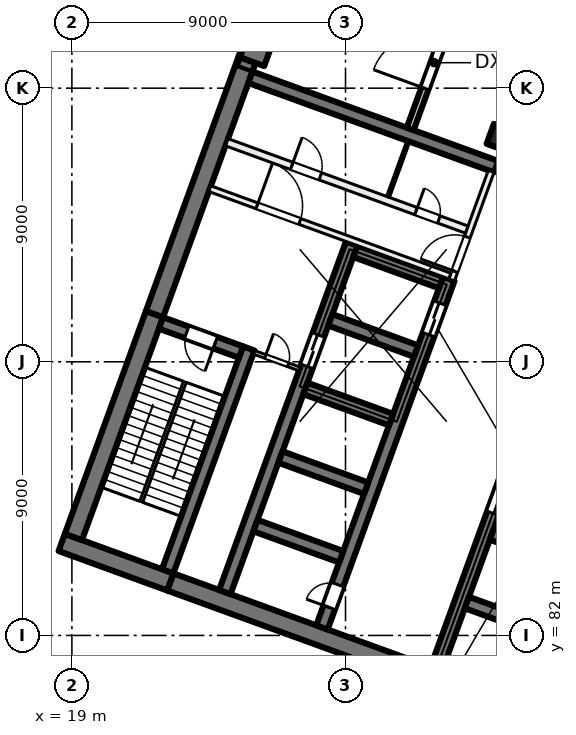
"""IFC4 building model, lengths in metres.
Left out: names, types, materials, properties, quantities, classifications, styles, units other than length and angle.
Written with IfcOpenShell. Run it as: python <this file> out.ifc"""

import sys

from ifc_helpers import new_model, si_unit, direction, frame, frame_2d, origin, origin_2d, place, context, subcontext, project, spatial, rectangle, extrude, element, fill, save


model = new_model("IFC4")
c1 = context("Model", 3, precision=1e-05, world=origin(), true_north=direction((0.0, 1.0)))
c2 = subcontext(c1, "Body", "Model", "MODEL_VIEW")
j1 = project(units=[si_unit("LENGTHUNIT", "METRE"), si_unit("PLANEANGLEUNIT", "RADIAN")], contexts=[c1])
p1 = place(None, origin())
s1 = spatial("IfcSite", under=j1, at=p1, CompositionType="ELEMENT")
p2 = place(p1, origin())
s2 = spatial("IfcBuilding", under=s1, at=p2, CompositionType="ELEMENT")
p3 = place(p2, frame((0.0, 0.0, 75.5)))
s3 = spatial("IfcBuildingStorey", under=s2, at=p3, CompositionType="ELEMENT", Elevation=75.5)
p4 = place(p3, frame((33.091, 98.379, 0.0), z_axis=(0.0, 0.0, 1.0), x_axis=(-0.342020143326, -0.939692620786, 0.0)))
e1 = element("IfcColumn", 1, at=p4, inside=s3, PredefinedType="COLUMN", context=c2, shape_type="SweptSolid", body=[
    extrude(rectangle(XDim=0.7, YDim=0.7, at=origin_2d()), origin(), (0.0, 0.0, 1.0), 5.5),
])
p5 = place(p3, frame((25.056, 101.303, 0.0), z_axis=(0.0, 0.0, 1.0), x_axis=(-0.342020143326, -0.939692620786, 0.0)))
e2 = element("IfcColumn", 2, at=p5, inside=s3, PredefinedType="COLUMN", context=c2, shape_type="SweptSolid", body=[
    extrude(rectangle(XDim=0.9, YDim=0.9, at=origin_2d()), origin(), (0.0, 0.0, 1.0), 5.5),
])
p6 = place(p3, frame((35.767, 78.835, 0.0), z_axis=(0.0, 0.0, 1.0), x_axis=(-0.939692894512, 0.342019391267, 0.0)))
e3 = element("IfcWall", 3, at=p6, inside=s3, PredefinedType="SHEAR", context=c2, shape_type="SweptSolid", body=[
    extrude(rectangle(XDim=14.4, YDim=0.6, at=frame_2d((7.2, 0.0))), origin(), (0.0, 0.0, 1.0), 5.5),
])
p7 = place(p3, frame((22.236, 83.76, 0.0), z_axis=(0.0, 0.0, 1.0), x_axis=(-0.939680822529, 0.342052557032, 0.0)))
e4 = element("IfcWall", 4, at=p7, inside=s3, PredefinedType="SHEAR", context=c2, shape_type="SweptSolid", body=[
    extrude(rectangle(XDim=3.8, YDim=0.6, at=frame_2d((1.9, 0.0))), origin(), (0.0, 0.0, 1.0), 5.5),
])
p8 = place(p3, frame((19.05, 85.239, 0.0), z_axis=(0.0, 0.0, 1.0), x_axis=(0.342016982193, 0.939693771338, 0.0)))
e5 = element("IfcWall", 5, at=p8, inside=s3, PredefinedType="SHEAR", context=c2, shape_type="SweptSolid", body=[
    extrude(rectangle(XDim=7.8, YDim=0.6, at=frame_2d((3.9, 0.0))), origin(), (0.0, 0.0, 1.0), 5.5),
])
p9 = place(p3, frame((21.717, 92.568, 0.0), z_axis=(0.0, 0.0, 1.0), x_axis=(0.342016162452, 0.939694069696, 0.0)))
e6 = element("IfcWall", 6, at=p9, inside=s3, PredefinedType="SHEAR", context=c2, shape_type="SweptSolid", body=[
    extrude(rectangle(XDim=8.9, YDim=0.6, at=frame_2d((4.45, 0.0))), origin(), (0.0, 0.0, 1.0), 5.5),
])
p10 = place(p3, frame((22.15, 84.11, 0.0), z_axis=(0.0, 0.0, 1.0), x_axis=(0.342016982193, 0.939693771338, 0.0)))
e7 = element("IfcWall", 7, at=p10, inside=s3, PredefinedType="SHEAR", context=c2, shape_type="SweptSolid", body=[
    extrude(rectangle(XDim=7.8, YDim=0.4, at=frame_2d((3.9, 0.0))), origin(), (0.0, 0.0, 1.0), 5.5),
])
p11 = place(p3, frame((24.562, 91.32, 0.0), z_axis=(0.0, 0.0, 1.0), x_axis=(-0.939717030584, 0.341953070509, 0.0)))
e8 = element("IfcWall", 8, at=p11, inside=s3, PredefinedType="SHEAR", context=c2, shape_type="SweptSolid", body=[
    extrude(rectangle(XDim=2.8, YDim=0.4, at=frame_2d((1.4, 0.0))), origin(), (0.0, 0.0, 1.0), 5.5),
])
p12 = place(p11, frame((0.9, 0.0, 0.0)))
e9 = element("IfcOpeningElement", 9, at=p12, cuts=e8, PredefinedType="OPENING", context=c2, shape_type="SweptSolid", body=[
    extrude(rectangle(XDim=1.0, YDim=2.1, at=frame_2d((0.5, 1.05))), frame((0.0, 0.21, 0.0), z_axis=(0.0, -1.0, 0.0), x_axis=(1.0, 0.0, 0.0)), (0.0, 0.0, 1.0), 0.42),
])
p13 = place(p3, frame((30.984, 80.895, 0.0), z_axis=(0.0, 0.0, 1.0), x_axis=(0.342021021735, 0.939692301071, 0.0)))
e10 = element("IfcWall", 10, at=p13, inside=s3, PredefinedType="SHEAR", context=c2, shape_type="SweptSolid", body=[
    extrude(rectangle(XDim=12.2, YDim=0.4, at=frame_2d((6.1, 0.0))), origin(), (0.0, 0.0, 1.0), 5.5),
])
p14 = place(p13, frame((5.45, 0.0, 0.0)))
e11 = element("IfcOpeningElement", 11, at=p14, cuts=e10, PredefinedType="OPENING", context=c2, shape_type="SweptSolid", body=[
    extrude(rectangle(XDim=1.1, YDim=2.1, at=frame_2d((0.55, 1.05))), frame((0.0, 0.21, 0.0), z_axis=(0.0, -1.0, 0.0), x_axis=(1.0, 0.0, 0.0)), (0.0, 0.0, 1.0), 0.42),
])
p15 = place(p13, frame((7.85, 0.0, 0.0)))
e12 = element("IfcOpeningElement", 12, at=p15, cuts=e10, PredefinedType="OPENING", context=c2, shape_type="SweptSolid", body=[
    extrude(rectangle(XDim=1.1, YDim=2.1, at=frame_2d((0.55, 1.05))), frame((0.0, 0.21, 0.0), z_axis=(0.0, -1.0, 0.0), x_axis=(1.0, 0.0, 0.0)), (0.0, 0.0, 1.0), 0.42),
])
p16 = place(p13, frame((10.25, 0.0, 0.0)))
e13 = element("IfcOpeningElement", 13, at=p16, cuts=e10, PredefinedType="OPENING", context=c2, shape_type="SweptSolid", body=[
    extrude(rectangle(XDim=1.1, YDim=2.1, at=frame_2d((0.55, 1.05))), frame((0.0, 0.21, 0.0), z_axis=(0.0, -1.0, 0.0), x_axis=(1.0, 0.0, 0.0)), (0.0, 0.0, 1.0), 0.42),
])
for number, where, z_axis, x_axis in (
    (14, (34.812, 82.056, 0.0), (0.0, 0.0, 1.0), (-0.94, 0.342, 0.0)),
    (15, (35.632, 84.311, 0.0), (0.0, 0.0, 1.0), (-0.94, 0.342, 0.0)),
):
    element("IfcWall", number, at=place(p3, frame(where, z_axis=z_axis, x_axis=x_axis)), inside=s3, PredefinedType="SHEAR", context=c2, shape_type="SweptSolid", body=[
        extrude(rectangle(XDim=3.0, YDim=0.4, at=frame_2d((1.5, 0.0))), origin(), (0.0, 0.0, 1.0), 5.5),
    ])
p17 = place(p3, frame((27.225, 82.263, 0.0), z_axis=(0.0, 0.0, 1.0), x_axis=(0.342014590177, 0.939694641948, 0.0)))
e16 = element("IfcWall", 16, at=p17, inside=s3, PredefinedType="SHEAR", context=c2, shape_type="SweptSolid", body=[
    extrude(rectangle(XDim=12.2, YDim=0.4, at=frame_2d((6.1, 0.0))), origin(), (0.0, 0.0, 1.0), 5.5),
])
p18 = place(p17, frame((10.25, 0.0, 0.0)))
e17 = element("IfcOpeningElement", 17, at=p18, cuts=e16, PredefinedType="OPENING", context=c2, shape_type="SweptSolid", body=[
    extrude(rectangle(XDim=1.1, YDim=2.1, at=frame_2d((0.55, 1.05))), frame((0.0, 0.21, 0.0), z_axis=(0.0, -1.0, 0.0), x_axis=(1.0, 0.0, 0.0)), (0.0, 0.0, 1.0), 0.42),
])
p19 = place(p17, frame((0.7, 0.0, 0.0)))
e18 = element("IfcOpeningElement", 18, at=p19, cuts=e16, PredefinedType="OPENING", context=c2, shape_type="SweptSolid", body=[
    extrude(rectangle(XDim=0.8, YDim=2.1, at=frame_2d((0.4, 1.05))), frame((0.0, 0.21, 0.0), z_axis=(0.0, -1.0, 0.0), x_axis=(1.0, 0.0, 0.0)), (0.0, 0.0, 1.0), 0.42),
])
p20 = place(p3, frame((24.03, 83.426, 0.0), z_axis=(0.0, 0.0, 1.0), x_axis=(0.342014590177, 0.939694641948, 0.0)))
e19 = element("IfcWall", 19, at=p20, inside=s3, PredefinedType="SHEAR", context=c2, shape_type="SweptSolid", body=[
    extrude(rectangle(XDim=12.2, YDim=0.4, at=frame_2d((6.1, 0.0))), origin(), (0.0, 0.0, 1.0), 5.5),
])
p21 = place(p20, frame((7.9, 0.0, 0.0)))
e20 = element("IfcOpeningElement", 20, at=p21, cuts=e19, PredefinedType="OPENING", context=c2, shape_type="SweptSolid", body=[
    extrude(rectangle(XDim=1.1, YDim=2.1, at=frame_2d((0.55, 1.05))), frame((0.0, 0.21, 0.0), z_axis=(0.0, -1.0, 0.0), x_axis=(1.0, 0.0, 0.0)), (0.0, 0.0, 1.0), 0.42),
])
p22 = place(p3, frame((27.858, 84.587, 0.0), z_axis=(0.0, 0.0, 1.0), x_axis=(-0.939686455819, 0.342037080957, 0.0)))
e21 = element("IfcWall", 21, at=p22, inside=s3, PredefinedType="SHEAR", context=c2, shape_type="SweptSolid", body=[
    extrude(rectangle(XDim=3.0, YDim=0.4, at=frame_2d((1.5, 0.0))), origin(), (0.0, 0.0, 1.0), 5.5),
])
p23 = place(p3, frame((28.678, 86.842, 0.0), z_axis=(0.0, 0.0, 1.0), x_axis=(-0.939676934218, 0.342063238742, 0.0)))
e22 = element("IfcWall", 22, at=p23, inside=s3, PredefinedType="SHEAR", context=c2, shape_type="SweptSolid", body=[
    extrude(rectangle(XDim=3.0, YDim=0.4, at=frame_2d((1.5, 0.0))), origin(), (0.0, 0.0, 1.0), 5.5),
])
for number, where, z_axis, x_axis in (
    (23, (29.5, 89.097, 0.0), (0.0, 0.0, 1.0), (-0.94, 0.342, 0.0)),
    (24, (30.32, 91.353, 0.0), (0.0, 0.0, 1.0), (-0.94, 0.342, 0.0)),
    (25, (31.141, 93.608, 0.0), (0.0, 0.0, 1.0), (-0.94, 0.342, 0.0)),
):
    element("IfcWall", number, at=place(p3, frame(where, z_axis=z_axis, x_axis=x_axis)), inside=s3, PredefinedType="SHEAR", context=c2, shape_type="SweptSolid", body=[
        extrude(rectangle(XDim=3.0, YDim=0.4, at=frame_2d((1.5, 0.0))), origin(), (0.0, 0.0, 1.0), 5.5),
    ])
p24 = place(p3, frame((32.953, 97.418, 0.0), z_axis=(0.0, 0.0, 1.0), x_axis=(-0.93969060187, 0.342025690201, 0.0)))
e26 = element("IfcWall", 26, at=p24, inside=s3, PredefinedType="SHEAR", context=c2, shape_type="SweptSolid", body=[
    extrude(rectangle(XDim=8.6, YDim=0.4, at=frame_2d((4.3, 0.0))), origin(), (0.0, 0.0, 1.0), 5.5),
])
p25 = place(p3, frame((30.128, 98.659, 0.0), z_axis=(0.0, 0.0, 1.0), x_axis=(0.341996679836, 0.939701160466, 0.0)))
e27 = element("IfcWall", 27, at=p25, inside=s3, PredefinedType="SOLIDWALL", context=c2, shape_type="SweptSolid", body=[
    extrude(rectangle(XDim=4.637, YDim=0.24, at=frame_2d((2.319, 0.0))), origin(), (0.0, 0.0, 1.0), 5.125),
])
p26 = place(p25, frame((1.419, 0.0, 0.0)))
e28 = element("IfcOpeningElement", 28, at=p26, cuts=e27, PredefinedType="OPENING", context=c2, shape_type="SweptSolid", body=[
    extrude(rectangle(XDim=1.8, YDim=2.4, at=frame_2d((0.9, 1.2))), frame((0.0, 0.13, 0.0), z_axis=(0.0, -1.0, 0.0), x_axis=(1.0, 0.0, 0.0)), (0.0, 0.0, 1.0), 0.26),
])
p27 = place(p3, frame((31.491, 93.693, 0.0), z_axis=(0.0, 0.0, 1.0), x_axis=(0.341995824804, 0.939701471648, 0.0)))
e29 = element("IfcWall", 29, at=p27, inside=s3, PredefinedType="PARTITIONING", context=c2, shape_type="SweptSolid", body=[
    extrude(rectangle(XDim=3.8, YDim=0.2, at=frame_2d((1.9, 0.0))), origin(), (0.0, 0.0, 1.0), 5.125),
])
p28 = place(p27, frame((0.3, 0.0, 0.0)))
e30 = element("IfcOpeningElement", 30, at=p28, cuts=e29, PredefinedType="OPENING", context=c2, shape_type="SweptSolid", body=[
    extrude(rectangle(XDim=1.2, YDim=2.1, at=frame_2d((0.6, 1.05))), frame((0.0, 0.11, 0.0), z_axis=(0.0, -1.0, 0.0), x_axis=(1.0, 0.0, 0.0)), (0.0, 0.0, 1.0), 0.22),
])
p29 = place(p3, frame((23.538, 96.694, 0.0), z_axis=(0.0, 0.0, 1.0), x_axis=(0.939691552312, -0.342023078919, 0.0)))
e31 = element("IfcWall", 31, at=p29, inside=s3, PredefinedType="PARTITIONING", context=c2, shape_type="SweptSolid", body=[
    extrude(rectangle(XDim=8.4, YDim=0.2, at=frame_2d((4.2, 0.0))), origin(), (0.0, 0.0, 1.0), 5.125),
])
p30 = place(p29, frame((1.65, 0.0, 0.0)))
e32 = element("IfcOpeningElement", 32, at=p30, cuts=e31, PredefinedType="OPENING", context=c2, shape_type="SweptSolid", body=[
    extrude(rectangle(XDim=1.5, YDim=2.1, at=frame_2d((0.75, 1.05))), frame((0.0, 0.11, 0.0), z_axis=(0.0, -1.0, 0.0), x_axis=(1.0, 0.0, 0.0)), (0.0, 0.0, 1.0), 0.22),
])
p31 = place(p3, frame((24.094, 98.221, 0.0), z_axis=(0.0, 0.0, 1.0), x_axis=(0.939691552312, -0.342023078919, 0.0)))
e33 = element("IfcWall", 33, at=p31, inside=s3, PredefinedType="PARTITIONING", context=c2, shape_type="SweptSolid", body=[
    extrude(rectangle(XDim=8.4, YDim=0.25, at=frame_2d((4.2, 0.0))), origin(), (0.0, 0.0, 1.0), 5.125),
])
p32 = place(p31, frame((6.625, 0.0, 0.0)))
e34 = element("IfcOpeningElement", 34, at=p32, cuts=e33, PredefinedType="OPENING", context=c2, shape_type="SweptSolid", body=[
    extrude(rectangle(XDim=0.8, YDim=2.1, at=frame_2d((0.4, 1.05))), frame((0.0, 0.135, 0.0), z_axis=(0.0, -1.0, 0.0), x_axis=(1.0, 0.0, 0.0)), (0.0, 0.0, 1.0), 0.27),
])
p33 = place(p31, frame((2.275, 0.0, 0.0)))
e35 = element("IfcOpeningElement", 35, at=p33, cuts=e33, PredefinedType="OPENING", context=c2, shape_type="SweptSolid", body=[
    extrude(rectangle(XDim=1.0, YDim=2.1, at=frame_2d((0.5, 1.05))), frame((0.0, 0.135, 0.0), z_axis=(0.0, -1.0, 0.0), x_axis=(1.0, 0.0, 0.0)), (0.0, 0.0, 1.0), 0.27),
])
p34 = place(p3, frame((24.985, 91.312, 0.0), z_axis=(0.0, 0.0, 1.0), x_axis=(0.939708740826, -0.341975850632, 0.0)))
e36 = element("IfcWall", 36, at=p34, inside=s3, PredefinedType="PARTITIONING", context=c2, shape_type="SweptSolid", body=[
    extrude(rectangle(XDim=1.6, YDim=0.125, at=frame_2d((0.8, 0.0))), origin(), (0.0, 0.0, 1.0), 5.125),
])
p35 = place(p34, frame((0.4, 0.0, 0.0)))
e37 = element("IfcOpeningElement", 37, at=p35, cuts=e36, PredefinedType="OPENING", context=c2, shape_type="SweptSolid", body=[
    extrude(rectangle(XDim=0.8, YDim=2.1, at=frame_2d((0.4, 1.05))), frame((0.0, 0.073, 0.0), z_axis=(0.0, -1.0, 0.0), x_axis=(1.0, 0.0, 0.0)), (0.0, 0.0, 1.0), 0.145),
])
p36 = place(p3, frame((29.399, 96.424, 0.0), z_axis=(0.0, 0.0, 1.0), x_axis=(0.341913947243, 0.939731266204, 0.0)))
e38 = element("IfcWall", 38, at=p36, inside=s3, PredefinedType="PARTITIONING", context=c2, shape_type="SweptSolid", body=[
    extrude(rectangle(XDim=1.95, YDim=0.1, at=frame_2d((0.975, 0.0))), origin(), (0.0, 0.0, 1.0), 5.125),
])
p37 = place(p26, origin())
e39 = element("IfcDoor", 39, at=p37, inside=s3, OperationType="DOUBLE_DOOR_SINGLE_SWING", PredefinedType="DOOR", context=c2, shape_type="SweptSolid", body=[
    extrude(rectangle(XDim=1.8, YDim=2.4, at=frame_2d((0.9, 1.2))), frame((0.0, 0.025, 0.0), z_axis=(0.0, -1.0, 0.0), x_axis=(1.0, 0.0, 0.0)), (0.0, 0.0, 1.0), 0.05),
])
fill(e28, e39)
p38 = place(p18, origin())
e40 = element("IfcDoor", 40, at=p38, inside=s3, OperationType="DOUBLE_DOOR_SLIDING", PredefinedType="DOOR", context=c2, shape_type="SweptSolid", body=[
    extrude(rectangle(XDim=1.1, YDim=2.1, at=frame_2d((0.55, 1.05))), frame((0.0, 0.025, 0.0), z_axis=(0.0, -1.0, 0.0), x_axis=(1.0, 0.0, 0.0)), (0.0, 0.0, 1.0), 0.05),
])
fill(e17, e40)
p39 = place(p14, origin())
e41 = element("IfcDoor", 41, at=p39, inside=s3, OperationType="DOUBLE_DOOR_SLIDING", PredefinedType="DOOR", context=c2, shape_type="SweptSolid", body=[
    extrude(rectangle(XDim=1.1, YDim=2.1, at=frame_2d((0.55, 1.05))), frame((0.0, 0.025, 0.0), z_axis=(0.0, -1.0, 0.0), x_axis=(1.0, 0.0, 0.0)), (0.0, 0.0, 1.0), 0.05),
])
fill(e11, e41)
p40 = place(p19, origin())
e42 = element("IfcDoor", 42, at=p40, inside=s3, OperationType="SINGLE_SWING_LEFT", PredefinedType="DOOR", context=c2, shape_type="SweptSolid", body=[
    extrude(rectangle(XDim=0.8, YDim=2.1, at=frame_2d((0.4, 1.05))), frame((0.0, 0.025, 0.0), z_axis=(0.0, -1.0, 0.0), x_axis=(1.0, 0.0, 0.0)), (0.0, 0.0, 1.0), 0.05),
])
fill(e18, e42)
p41 = place(p28, origin())
e43 = element("IfcDoor", 43, at=p41, inside=s3, OperationType="DOUBLE_DOOR_SINGLE_SWING", PredefinedType="DOOR", context=c2, shape_type="SweptSolid", body=[
    extrude(rectangle(XDim=1.2, YDim=2.1, at=frame_2d((0.6, 1.05))), frame((0.0, 0.025, 0.0), z_axis=(0.0, -1.0, 0.0), x_axis=(1.0, 0.0, 0.0)), (0.0, 0.0, 1.0), 0.05),
])
fill(e30, e43)
p42 = place(p30, origin())
e44 = element("IfcDoor", 44, at=p42, inside=s3, OperationType="DOUBLE_DOOR_SINGLE_SWING", PredefinedType="DOOR", context=c2, shape_type="SweptSolid", body=[
    extrude(rectangle(XDim=1.5, YDim=2.1, at=frame_2d((0.75, 1.05))), frame((0.0, 0.025, 0.0), z_axis=(0.0, -1.0, 0.0), x_axis=(1.0, 0.0, 0.0)), (0.0, 0.0, 1.0), 0.05),
])
fill(e32, e44)
p43 = place(p12, origin())
e45 = element("IfcDoor", 45, at=p43, inside=s3, OperationType="SINGLE_SWING_LEFT", PredefinedType="DOOR", context=c2, shape_type="SweptSolid", body=[
    extrude(rectangle(XDim=1.0, YDim=2.1, at=frame_2d((0.5, 1.05))), frame((0.0, 0.025, 0.0), z_axis=(0.0, -1.0, 0.0), x_axis=(1.0, 0.0, 0.0)), (0.0, 0.0, 1.0), 0.05),
])
fill(e9, e45)
p44 = place(p35, origin())
e46 = element("IfcDoor", 46, at=p44, inside=s3, OperationType="SINGLE_SWING_RIGHT", PredefinedType="DOOR", context=c2, shape_type="SweptSolid", body=[
    extrude(rectangle(XDim=0.8, YDim=2.1, at=frame_2d((0.4, 1.05))), frame((0.0, 0.025, 0.0), z_axis=(0.0, -1.0, 0.0), x_axis=(1.0, 0.0, 0.0)), (0.0, 0.0, 1.0), 0.05),
])
fill(e37, e46)
p45 = place(p32, origin())
e47 = element("IfcDoor", 47, at=p45, inside=s3, OperationType="SINGLE_SWING_LEFT", PredefinedType="DOOR", context=c2, shape_type="SweptSolid", body=[
    extrude(rectangle(XDim=0.8, YDim=2.1, at=frame_2d((0.4, 1.05))), frame((0.0, 0.025, 0.0), z_axis=(0.0, -1.0, 0.0), x_axis=(1.0, 0.0, 0.0)), (0.0, 0.0, 1.0), 0.05),
])
fill(e34, e47)
p46 = place(p33, origin())
e48 = element("IfcDoor", 48, at=p46, inside=s3, OperationType="SINGLE_SWING_RIGHT", PredefinedType="DOOR", context=c2, shape_type="SweptSolid", body=[
    extrude(rectangle(XDim=1.0, YDim=2.1, at=frame_2d((0.5, 1.05))), frame((0.0, 0.025, 0.0), z_axis=(0.0, -1.0, 0.0), x_axis=(1.0, 0.0, 0.0)), (0.0, 0.0, 1.0), 0.05),
])
fill(e35, e48)
p47 = place(p21, origin())
e49 = element("IfcDoor", 49, at=p47, inside=s3, OperationType="DOUBLE_DOOR_SLIDING", PredefinedType="DOOR", context=c2, shape_type="SweptSolid", body=[
    extrude(rectangle(XDim=1.1, YDim=2.1, at=frame_2d((0.55, 1.05))), frame((0.0, 0.025, 0.0), z_axis=(0.0, -1.0, 0.0), x_axis=(1.0, 0.0, 0.0)), (0.0, 0.0, 1.0), 0.05),
])
fill(e20, e49)
save(model, sys.argv[1])
